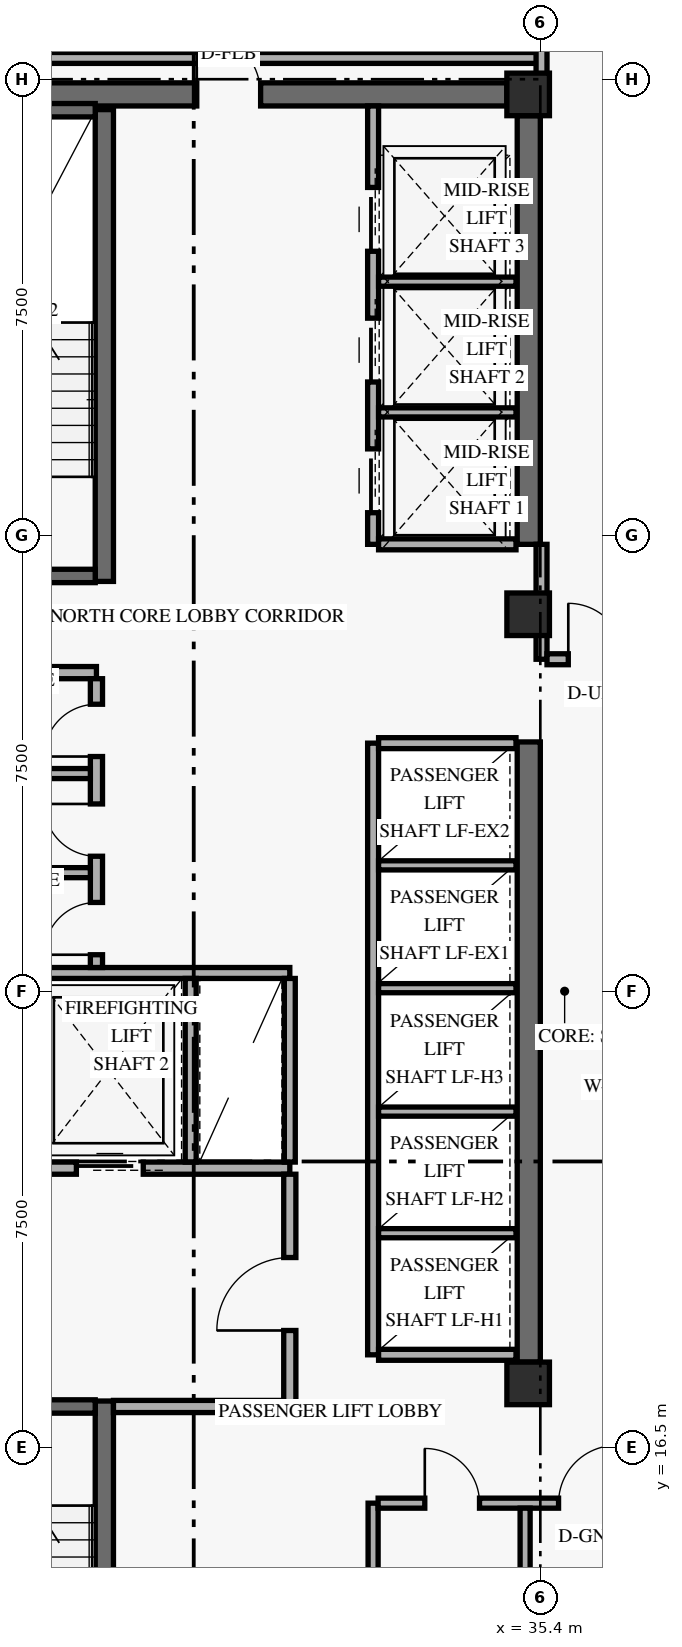
"""IFC4 building model, lengths in metres.
Left out: names, types, materials, properties, quantities, classifications, styles, units other than length and angle.
Written with IfcOpenShell. Run it as: python <this file> out.ifc"""

import sys

from ifc_helpers import new_model, si_unit, direction, frame, frame_2d, origin, origin_2d, place, context, subcontext, project, spatial, rectangle, extrude, element, fill, save


model = new_model("IFC4")
c1 = context("Model", 3, precision=1e-05, world=origin(), true_north=direction((0.0, 1.0)))
c2 = subcontext(c1, "Body", "Model", "MODEL_VIEW")
j1 = project(units=[si_unit("LENGTHUNIT", "METRE"), si_unit("PLANEANGLEUNIT", "RADIAN")], contexts=[c1])
p1 = place(None, origin())
s1 = spatial("IfcSite", under=j1, at=p1, CompositionType="ELEMENT")
p2 = place(p1, origin())
s2 = spatial("IfcBuilding", under=s1, at=p2, CompositionType="ELEMENT")
p3 = place(p2, frame((0.0, 0.0, 162.6)))
s3 = spatial("IfcBuildingStorey", under=s2, at=p3, CompositionType="ELEMENT", Elevation=162.6)
p4 = place(p3, frame((35.21, 17.9, 0.0), z_axis=(0.0, 0.0, 1.0), x_axis=(0.0, 1.0, 0.0)))
e1 = element("IfcWall", 1, at=p4, inside=s3, PredefinedType="SHEAR", context=c2, shape_type="SweptSolid", body=[
    extrude(rectangle(XDim=10.2, YDim=0.38, at=frame_2d((5.1, 0.0))), origin(), (0.0, 0.0, 1.0), 2.748),
])
p5 = place(p3, frame((35.21, 31.35, 0.0), z_axis=(0.0, 0.0, 1.0), x_axis=(0.0, 1.0, 0.0)))
e2 = element("IfcWall", 2, at=p5, inside=s3, PredefinedType="SHEAR", context=c2, shape_type="SweptSolid", body=[
    extrude(rectangle(XDim=7.05, YDim=0.38, at=frame_2d((3.525, 0.0))), origin(), (0.0, 0.0, 1.0), 2.748),
])
p6 = place(p3, frame((24.55, 38.75, 0.0), z_axis=(0.0, 0.0, 1.0), x_axis=(1.0, 0.0, 0.0)))
e3 = element("IfcWall", 3, at=p6, inside=s3, PredefinedType="SHEAR", context=c2, shape_type="SweptSolid", body=[
    extrude(rectangle(XDim=10.3, YDim=0.38, at=frame_2d((5.15, 0.0))), origin(), (0.0, 0.0, 1.0), 3.36),
])
p7 = place(p6, frame((5.2, 0.0, 0.0)))
e4 = element("IfcOpeningElement", 4, at=p7, cuts=e3, PredefinedType="OPENING", context=c2, shape_type="SweptSolid", body=[
    extrude(rectangle(XDim=1.05, YDim=2.15, at=frame_2d((0.525, 1.075))), frame((0.0, 0.2, 0.0), z_axis=(0.0, -1.0, 0.0), x_axis=(1.0, 0.0, 0.0)), (0.0, 0.0, 1.0), 0.4),
])
p8 = place(p3, frame((28.23, 9.5, 0.0), z_axis=(0.0, 0.0, 1.0), x_axis=(0.0, 1.0, 0.0)))
e5 = element("IfcWall", 5, at=p8, inside=s3, PredefinedType="SHEAR", context=c2, shape_type="SweptSolid", body=[
    extrude(rectangle(XDim=7.76, YDim=0.3, at=frame_2d((3.88, 0.0))), origin(), (0.0, 0.0, 1.0), 3.36),
])
p9 = place(p3, frame((24.92, 17.17, 0.0), z_axis=(0.0, 0.0, 1.0), x_axis=(1.0, 0.0, 0.0)))
e6 = element("IfcWall", 6, at=p9, inside=s3, PredefinedType="SHEAR", context=c2, shape_type="SweptSolid", body=[
    extrude(rectangle(XDim=3.16, YDim=0.22, at=frame_2d((1.58, 0.0))), origin(), (0.0, 0.0, 1.0), 3.36),
])
p10 = place(p9, frame((0.78, 0.0, 0.0)))
e7 = element("IfcOpeningElement", 7, at=p10, cuts=e6, PredefinedType="OPENING", context=c2, shape_type="SweptSolid", body=[
    extrude(rectangle(XDim=1.05, YDim=2.15, at=frame_2d((0.525, 1.075))), frame((0.0, 0.12, 0.0), z_axis=(0.0, -1.0, 0.0), x_axis=(1.0, 0.0, 0.0)), (0.0, 0.0, 1.0), 0.24),
])
p11 = place(p3, frame((28.23, 30.74, 0.0), z_axis=(0.0, 0.0, 1.0), x_axis=(0.0, 1.0, 0.0)))
e8 = element("IfcWall", 8, at=p11, inside=s3, PredefinedType="SHEAR", context=c2, shape_type="SweptSolid", body=[
    extrude(rectangle(XDim=7.76, YDim=0.3, at=frame_2d((3.88, 0.0))), origin(), (0.0, 0.0, 1.0), 3.36),
])
p12 = place(p3, frame((24.92, 30.83, 0.0), z_axis=(0.0, 0.0, 1.0), x_axis=(1.0, 0.0, 0.0)))
e9 = element("IfcWall", 9, at=p12, inside=s3, PredefinedType="SHEAR", context=c2, shape_type="SweptSolid", body=[
    extrude(rectangle(XDim=3.16, YDim=0.22, at=frame_2d((1.58, 0.0))), origin(), (0.0, 0.0, 1.0), 3.36),
])
p13 = place(p12, frame((0.78, 0.0, 0.0)))
e10 = element("IfcOpeningElement", 10, at=p13, cuts=e9, PredefinedType="OPENING", context=c2, shape_type="SweptSolid", body=[
    extrude(rectangle(XDim=1.05, YDim=2.15, at=frame_2d((0.525, 1.075))), frame((0.0, 0.12, 0.0), z_axis=(0.0, -1.0, 0.0), x_axis=(1.0, 0.0, 0.0)), (0.0, 0.0, 1.0), 0.24),
])
p14 = place(p3, frame((24.92, 38.49, 0.0), z_axis=(0.0, 0.0, 1.0), x_axis=(1.0, 0.0, 0.0)))
e11 = element("IfcWall", 11, at=p14, inside=s3, PredefinedType="SHEAR", context=c2, shape_type="SweptSolid", body=[
    extrude(rectangle(XDim=3.16, YDim=0.22, at=frame_2d((1.58, 0.0))), origin(), (0.0, 0.0, 1.0), 3.36),
])
for number, where, z_axis, x_axis in (
    (12, (35.2, 17.55, 0.0), (0.0, 0.0, 1.0), (1.0, 0.0, 0.0)),
    (13, (35.2, 30.2, 0.0), (0.0, 0.0, 1.0), (1.0, 0.0, 0.0)),
    (14, (35.2, 38.75, 0.0), (0.0, 0.0, 1.0), (1.0, 0.0, 0.0)),
):
    element("IfcColumn", number, at=place(p3, frame(where, z_axis=z_axis, x_axis=x_axis)), inside=s3, PredefinedType="COLUMN", context=c2, shape_type="SweptSolid", body=[
        extrude(rectangle(XDim=0.7, YDim=0.7, at=origin_2d()), origin(), (0.0, 0.0, 1.0), 3.6),
    ])
p15 = place(p3, frame((24.45, 21.09, 0.0), z_axis=(0.0, 0.0, 1.0), x_axis=(1.0, 0.0, 0.0)))
e15 = element("IfcWall", 15, at=p15, inside=s3, PredefinedType="STANDARD", context=c2, shape_type="SweptSolid", body=[
    extrude(rectangle(XDim=6.83, YDim=0.2, at=frame_2d((3.415, 0.0))), origin(), (0.0, 0.0, 1.0), 3.36),
])
p16 = place(p15, frame((0.72, 0.0, 0.0)))
e16 = element("IfcOpeningElement", 16, at=p16, cuts=e15, PredefinedType="OPENING", context=c2, shape_type="SweptSolid", body=[
    extrude(rectangle(XDim=1.1, YDim=2.2, at=frame_2d((0.55, 1.1))), frame((0.0, 0.11, 0.0), z_axis=(0.0, -1.0, 0.0), x_axis=(1.0, 0.0, 0.0)), (0.0, 0.0, 1.0), 0.22),
])
p17 = place(p15, frame((3.32, 0.0, 0.0)))
e17 = element("IfcOpeningElement", 17, at=p17, cuts=e15, PredefinedType="OPENING", context=c2, shape_type="SweptSolid", body=[
    extrude(rectangle(XDim=1.1, YDim=2.2, at=frame_2d((0.55, 1.1))), frame((0.0, 0.11, 0.0), z_axis=(0.0, -1.0, 0.0), x_axis=(1.0, 0.0, 0.0)), (0.0, 0.0, 1.0), 0.22),
])
p18 = place(p3, frame((28.38, 17.17, 0.0), z_axis=(0.0, 0.0, 1.0), x_axis=(1.0, 0.0, 0.0)))
e18 = element("IfcWall", 18, at=p18, inside=s3, PredefinedType="STANDARD", context=c2, shape_type="SweptSolid", body=[
    extrude(rectangle(XDim=2.9, YDim=0.2, at=frame_2d((1.45, 0.0))), origin(), (0.0, 0.0, 1.0), 3.36),
])
p19 = place(p3, frame((31.28, 17.07, 0.0), z_axis=(0.0, 0.0, 1.0), x_axis=(0.0, 1.0, 0.0)))
e19 = element("IfcWall", 19, at=p19, inside=s3, PredefinedType="STANDARD", context=c2, shape_type="SweptSolid", body=[
    extrude(rectangle(XDim=3.92, YDim=0.2, at=frame_2d((1.96, 0.0))), origin(), (0.0, 0.0, 1.0), 2.73),
])
p20 = place(p19, frame((1.35, 0.0, 0.0)))
e20 = element("IfcOpeningElement", 20, at=p20, cuts=e19, PredefinedType="OPENING", context=c2, shape_type="SweptSolid", body=[
    extrude(rectangle(XDim=1.2, YDim=2.15, at=frame_2d((0.6, 1.075))), frame((0.0, 0.11, 0.0), z_axis=(0.0, -1.0, 0.0), x_axis=(1.0, 0.0, 0.0)), (0.0, 0.0, 1.0), 0.22),
])
p21 = place(p3, frame((24.45, 24.3, 0.0), z_axis=(0.0, 0.0, 1.0), x_axis=(1.0, 0.0, 0.0)))
e21 = element("IfcWall", 21, at=p21, inside=s3, PredefinedType="STANDARD", context=c2, shape_type="SweptSolid", body=[
    extrude(rectangle(XDim=6.83, YDim=0.18, at=frame_2d((3.415, 0.0))), origin(), (0.0, 0.0, 1.0), 3.36),
])
for number, where, z_axis, x_axis in (
    (22, (29.65, 21.19, 0.0), (0.0, 0.0, 1.0), (0.0, 1.0, 0.0)),
    (23, (31.28, 21.19, 0.0), (0.0, 0.0, 1.0), (0.0, 1.0, 0.0)),
):
    element("IfcWall", number, at=place(p3, frame(where, z_axis=z_axis, x_axis=x_axis)), inside=s3, PredefinedType="STANDARD", context=c2, shape_type="SweptSolid", body=[
        extrude(rectangle(XDim=3.02, YDim=0.18, at=frame_2d((1.51, 0.0))), origin(), (0.0, 0.0, 1.0), 3.36),
    ])
p22 = place(p3, frame((24.45, 29.24, 0.0), z_axis=(0.0, 0.0, 1.0), x_axis=(1.0, 0.0, 0.0)))
e24 = element("IfcWall", 24, at=p22, inside=s3, PredefinedType="STANDARD", context=c2, shape_type="SweptSolid", body=[
    extrude(rectangle(XDim=3.65, YDim=0.2, at=frame_2d((1.825, 0.0))), origin(), (0.0, 0.0, 1.0), 3.36),
])
p23 = place(p3, frame((28.1, 24.39, 0.0), z_axis=(0.0, 0.0, 1.0), x_axis=(0.0, 1.0, 0.0)))
e25 = element("IfcWall", 25, at=p23, inside=s3, PredefinedType="STANDARD", context=c2, shape_type="SweptSolid", body=[
    extrude(rectangle(XDim=4.75, YDim=0.2, at=frame_2d((2.375, 0.0))), origin(), (0.0, 0.0, 1.0), 3.36),
])
p24 = place(p23, frame((0.21, 0.0, 0.0)))
e26 = element("IfcOpeningElement", 26, at=p24, cuts=e25, PredefinedType="OPENING", context=c2, shape_type="SweptSolid", body=[
    extrude(rectangle(XDim=0.86, YDim=2.1, at=frame_2d((0.43, 1.05))), frame((0.0, 0.11, 0.0), z_axis=(0.0, -1.0, 0.0), x_axis=(1.0, 0.0, 0.0)), (0.0, 0.0, 1.0), 0.22),
])
p25 = place(p23, frame((1.83, 0.0, 0.0)))
e27 = element("IfcOpeningElement", 27, at=p25, cuts=e25, PredefinedType="OPENING", context=c2, shape_type="SweptSolid", body=[
    extrude(rectangle(XDim=0.86, YDim=2.1, at=frame_2d((0.43, 1.05))), frame((0.0, 0.11, 0.0), z_axis=(0.0, -1.0, 0.0), x_axis=(1.0, 0.0, 0.0)), (0.0, 0.0, 1.0), 0.22),
])
p26 = place(p23, frame((3.47, 0.0, 0.0)))
e28 = element("IfcOpeningElement", 28, at=p26, cuts=e25, PredefinedType="OPENING", context=c2, shape_type="SweptSolid", body=[
    extrude(rectangle(XDim=0.86, YDim=2.1, at=frame_2d((0.43, 1.05))), frame((0.0, 0.11, 0.0), z_axis=(0.0, -1.0, 0.0), x_axis=(1.0, 0.0, 0.0)), (0.0, 0.0, 1.0), 0.22),
])
for number, where, z_axis, x_axis in (
    (29, (24.45, 25.95, 0.0), (0.0, 0.0, 1.0), (1.0, 0.0, 0.0)),
    (30, (24.45, 27.58, 0.0), (0.0, 0.0, 1.0), (1.0, 0.0, 0.0)),
):
    element("IfcWall", number, at=place(p3, frame(where, z_axis=z_axis, x_axis=x_axis)), inside=s3, PredefinedType="PARTITIONING", context=c2, shape_type="SweptSolid", body=[
        extrude(rectangle(XDim=3.55, YDim=0.165, at=frame_2d((1.775, 0.0))), origin(), (0.0, 0.0, 1.0), 3.36),
    ])
p27 = place(p3, frame((32.65, 18.02, 0.0), z_axis=(0.0, 0.0, 1.0), x_axis=(0.0, 1.0, 0.0)))
e31 = element("IfcWall", 31, at=p27, inside=s3, PredefinedType="STANDARD", context=c2, shape_type="SweptSolid", body=[
    extrude(rectangle(XDim=10.06, YDim=0.18, at=frame_2d((5.03, 0.0))), origin(), (0.0, 0.0, 1.0), 3.36),
])
for number, where, z_axis, x_axis in (
    (32, (32.74, 18.02, 0.0), (0.0, 0.0, 1.0), (1.0, 0.0, 0.0)),
    (33, (32.74, 28.08, 0.0), (0.0, 0.0, 1.0), (1.0, 0.0, 0.0)),
):
    element("IfcWall", number, at=place(p3, frame(where, z_axis=z_axis, x_axis=x_axis)), inside=s3, PredefinedType="STANDARD", context=c2, shape_type="SweptSolid", body=[
        extrude(rectangle(XDim=2.26, YDim=0.18, at=frame_2d((1.13, 0.0))), origin(), (0.0, 0.0, 1.0), 3.36),
    ])
for number, where, z_axis, x_axis in (
    (34, (32.74, 20.02, 0.0), (0.0, 0.0, 1.0), (1.0, 0.0, 0.0)),
    (35, (32.74, 22.02, 0.0), (0.0, 0.0, 1.0), (1.0, 0.0, 0.0)),
    (36, (32.74, 24.05, 0.0), (0.0, 0.0, 1.0), (1.0, 0.0, 0.0)),
    (37, (32.74, 26.07, 0.0), (0.0, 0.0, 1.0), (1.0, 0.0, 0.0)),
):
    element("IfcWall", number, at=place(p3, frame(where, z_axis=z_axis, x_axis=x_axis)), inside=s3, PredefinedType="STANDARD", context=c2, shape_type="SweptSolid", body=[
        extrude(rectangle(XDim=2.26, YDim=0.15, at=frame_2d((1.13, 0.0))), origin(), (0.0, 0.0, 1.0), 3.36),
    ])
p28 = place(p3, frame((32.65, 31.35, 0.0), z_axis=(0.0, 0.0, 1.0), x_axis=(0.0, 1.0, 0.0)))
e38 = element("IfcWall", 38, at=p28, inside=s3, PredefinedType="STANDARD", context=c2, shape_type="SweptSolid", body=[
    extrude(rectangle(XDim=7.21, YDim=0.18, at=frame_2d((3.605, 0.0))), origin(), (0.0, 0.0, 1.0), 3.36),
])
p29 = place(p28, frame((0.52, 0.0, 0.0)))
e39 = element("IfcOpeningElement", 39, at=p29, cuts=e38, PredefinedType="OPENING", context=c2, shape_type="SweptSolid", body=[
    extrude(rectangle(XDim=1.05, YDim=2.2, at=frame_2d((0.525, 1.1))), frame((0.0, 0.1, 0.0), z_axis=(0.0, -1.0, 0.0), x_axis=(1.0, 0.0, 0.0)), (0.0, 0.0, 1.0), 0.2),
])
p30 = place(p28, frame((2.67, 0.0, 0.0)))
e40 = element("IfcOpeningElement", 40, at=p30, cuts=e38, PredefinedType="OPENING", context=c2, shape_type="SweptSolid", body=[
    extrude(rectangle(XDim=1.05, YDim=2.2, at=frame_2d((0.525, 1.1))), frame((0.0, 0.1, 0.0), z_axis=(0.0, -1.0, 0.0), x_axis=(1.0, 0.0, 0.0)), (0.0, 0.0, 1.0), 0.2),
])
p31 = place(p28, frame((4.82, 0.0, 0.0)))
e41 = element("IfcOpeningElement", 41, at=p31, cuts=e38, PredefinedType="OPENING", context=c2, shape_type="SweptSolid", body=[
    extrude(rectangle(XDim=1.05, YDim=2.2, at=frame_2d((0.525, 1.1))), frame((0.0, 0.1, 0.0), z_axis=(0.0, -1.0, 0.0), x_axis=(1.0, 0.0, 0.0)), (0.0, 0.0, 1.0), 0.2),
])
p32 = place(p3, frame((32.74, 31.35, 0.0), z_axis=(0.0, 0.0, 1.0), x_axis=(1.0, 0.0, 0.0)))
e42 = element("IfcWall", 42, at=p32, inside=s3, PredefinedType="STANDARD", context=c2, shape_type="SweptSolid", body=[
    extrude(rectangle(XDim=2.26, YDim=0.18, at=frame_2d((1.13, 0.0))), origin(), (0.0, 0.0, 1.0), 3.36),
])
for number, where, z_axis, x_axis in (
    (43, (32.74, 33.52, 0.0), (0.0, 0.0, 1.0), (1.0, 0.0, 0.0)),
    (44, (32.74, 35.67, 0.0), (0.0, 0.0, 1.0), (1.0, 0.0, 0.0)),
):
    element("IfcWall", number, at=place(p3, frame(where, z_axis=z_axis, x_axis=x_axis)), inside=s3, PredefinedType="STANDARD", context=c2, shape_type="SweptSolid", body=[
        extrude(rectangle(XDim=2.26, YDim=0.15, at=frame_2d((1.13, 0.0))), origin(), (0.0, 0.0, 1.0), 3.36),
    ])
p33 = place(p3, frame((32.65, 9.5, 0.0), z_axis=(0.0, 0.0, 1.0), x_axis=(0.0, 1.0, 0.0)))
e45 = element("IfcWall", 45, at=p33, inside=s3, PredefinedType="PARTITIONING", context=c2, shape_type="SweptSolid", body=[
    extrude(rectangle(XDim=6.08, YDim=0.165, at=frame_2d((3.04, 0.0))), origin(), (0.0, 0.0, 1.0), 3.36),
])
p34 = place(p3, frame((32.732, 15.58, 0.0), z_axis=(0.0, 0.0, 1.0), x_axis=(1.0, 0.0, 0.0)))
e46 = element("IfcWall", 46, at=p34, inside=s3, PredefinedType="PARTITIONING", context=c2, shape_type="SweptSolid", body=[
    extrude(rectangle(XDim=4.818, YDim=0.165, at=frame_2d((2.409, 0.0))), origin(), (0.0, 0.0, 1.0), 2.73),
])
p35 = place(p34, frame((0.768, 0.0, 0.0)))
e47 = element("IfcOpeningElement", 47, at=p35, cuts=e46, PredefinedType="OPENING", context=c2, shape_type="SweptSolid", body=[
    extrude(rectangle(XDim=0.9, YDim=2.1, at=frame_2d((0.45, 1.05))), frame((0.0, 0.093, 0.0), z_axis=(0.0, -1.0, 0.0), x_axis=(1.0, 0.0, 0.0)), (0.0, 0.0, 1.0), 0.185),
])
p36 = place(p34, frame((2.968, 0.0, 0.0)))
e48 = element("IfcOpeningElement", 48, at=p36, cuts=e46, PredefinedType="OPENING", context=c2, shape_type="SweptSolid", body=[
    extrude(rectangle(XDim=0.95, YDim=2.15, at=frame_2d((0.475, 1.075))), frame((0.0, 0.093, 0.0), z_axis=(0.0, -1.0, 0.0), x_axis=(1.0, 0.0, 0.0)), (0.0, 0.0, 1.0), 0.185),
])
p37 = place(p3, frame((35.15, 9.5, 0.0), z_axis=(0.0, 0.0, 1.0), x_axis=(0.0, 1.0, 0.0)))
e49 = element("IfcWall", 49, at=p37, inside=s3, PredefinedType="PARTITIONING", context=c2, shape_type="SweptSolid", body=[
    extrude(rectangle(XDim=5.998, YDim=0.165, at=frame_2d((2.999, 0.0))), origin(), (0.0, 0.0, 1.0), 2.73),
])
p38 = place(p3, frame((35.42, 29.46, 0.0), z_axis=(0.0, 0.0, 1.0), x_axis=(0.0, 1.0, 0.0)))
e50 = element("IfcWall", 50, at=p38, inside=s3, PredefinedType="STANDARD", context=c2, shape_type="SweptSolid", body=[
    extrude(rectangle(XDim=1.89, YDim=0.18, at=frame_2d((0.945, 0.0))), origin(), (0.0, 0.0, 1.0), 2.73),
])
p39 = place(p3, frame((35.51, 29.46, 0.0), z_axis=(0.0, 0.0, 1.0), x_axis=(1.0, 0.0, 0.0)))
e51 = element("IfcWall", 51, at=p39, inside=s3, PredefinedType="STANDARD", context=c2, shape_type="SweptSolid", body=[
    extrude(rectangle(XDim=14.29, YDim=0.18, at=frame_2d((7.145, 0.0))), origin(), (0.0, 0.0, 1.0), 2.73),
])
p40 = place(p39, frame((0.35, 0.0, 0.0)))
e52 = element("IfcOpeningElement", 52, at=p40, cuts=e51, PredefinedType="OPENING", context=c2, shape_type="SweptSolid", body=[
    extrude(rectangle(XDim=0.92, YDim=2.15, at=frame_2d((0.46, 1.075))), frame((0.0, 0.1, 0.0), z_axis=(0.0, -1.0, 0.0), x_axis=(1.0, 0.0, 0.0)), (0.0, 0.0, 1.0), 0.2),
])
p41 = place(p39, frame((7.828, 0.0, 0.0)))
e53 = element("IfcOpeningElement", 53, at=p41, cuts=e51, PredefinedType="OPENING", context=c2, shape_type="SweptSolid", body=[
    extrude(rectangle(XDim=0.92, YDim=2.15, at=frame_2d((0.46, 1.075))), frame((0.0, 0.1, 0.0), z_axis=(0.0, -1.0, 0.0), x_axis=(1.0, 0.0, 0.0)), (0.0, 0.0, 1.0), 0.2),
])
p42 = place(p3, frame((23.85, 39.35, 0.0), z_axis=(0.0, 0.0, 1.0), x_axis=(1.0, 0.0, 0.0)))
e54 = element("IfcWall", 54, at=p42, inside=s3, PredefinedType="STANDARD", context=c2, shape_type="SweptSolid", body=[
    extrude(rectangle(XDim=11.57, YDim=0.18, at=frame_2d((5.785, 0.0))), origin(), (0.0, 0.0, 1.0), 2.73),
])
p43 = place(p3, frame((35.42, 38.75, 0.0), z_axis=(0.0, 0.0, 1.0), x_axis=(0.0, 1.0, 0.0)))
e55 = element("IfcWall", 55, at=p43, inside=s3, PredefinedType="PARTITIONING", context=c2, shape_type="SweptSolid", body=[
    extrude(rectangle(XDim=4.97, YDim=0.18, at=frame_2d((2.485, 0.0))), origin(), (0.0, 0.0, 1.0), 2.73),
])
p44 = place(p17, origin())
e56 = element("IfcDoor", 56, at=p44, inside=s3, OperationType="SLIDING_TO_LEFT", PredefinedType="DOOR", context=c2, shape_type="SweptSolid", body=[
    extrude(rectangle(XDim=1.1, YDim=2.2, at=frame_2d((0.55, 1.1))), frame((0.0, 0.025, 0.0), z_axis=(0.0, -1.0, 0.0), x_axis=(1.0, 0.0, 0.0)), (0.0, 0.0, 1.0), 0.05),
])
fill(e17, e56)
p45 = place(p20, origin())
e57 = element("IfcDoor", 57, at=p45, inside=s3, OperationType="SINGLE_SWING_LEFT", PredefinedType="DOOR", context=c2, shape_type="SweptSolid", body=[
    extrude(rectangle(XDim=1.2, YDim=2.15, at=frame_2d((0.6, 1.075))), frame((0.0, 0.025, 0.0), z_axis=(0.0, -1.0, 0.0), x_axis=(1.0, 0.0, 0.0)), (0.0, 0.0, 1.0), 0.05),
])
fill(e20, e57)
p46 = place(p24, origin())
e58 = element("IfcDoor", 58, at=p46, inside=s3, OperationType="SINGLE_SWING_LEFT", PredefinedType="DOOR", context=c2, shape_type="SweptSolid", body=[
    extrude(rectangle(XDim=0.86, YDim=2.1, at=frame_2d((0.43, 1.05))), frame((0.0, 0.025, 0.0), z_axis=(0.0, -1.0, 0.0), x_axis=(1.0, 0.0, 0.0)), (0.0, 0.0, 1.0), 0.05),
])
fill(e26, e58)
p47 = place(p25, origin())
e59 = element("IfcDoor", 59, at=p47, inside=s3, OperationType="SINGLE_SWING_RIGHT", PredefinedType="DOOR", context=c2, shape_type="SweptSolid", body=[
    extrude(rectangle(XDim=0.86, YDim=2.1, at=frame_2d((0.43, 1.05))), frame((0.0, 0.025, 0.0), z_axis=(0.0, -1.0, 0.0), x_axis=(1.0, 0.0, 0.0)), (0.0, 0.0, 1.0), 0.05),
])
fill(e27, e59)
p48 = place(p26, origin())
e60 = element("IfcDoor", 60, at=p48, inside=s3, OperationType="SINGLE_SWING_LEFT", PredefinedType="DOOR", context=c2, shape_type="SweptSolid", body=[
    extrude(rectangle(XDim=0.86, YDim=2.1, at=frame_2d((0.43, 1.05))), frame((0.0, 0.025, 0.0), z_axis=(0.0, -1.0, 0.0), x_axis=(1.0, 0.0, 0.0)), (0.0, 0.0, 1.0), 0.05),
])
fill(e28, e60)
p49 = place(p29, origin())
e61 = element("IfcDoor", 61, at=p49, inside=s3, OperationType="SLIDING_TO_LEFT", PredefinedType="DOOR", context=c2, shape_type="SweptSolid", body=[
    extrude(rectangle(XDim=1.05, YDim=2.2, at=frame_2d((0.525, 1.1))), frame((0.0, 0.025, 0.0), z_axis=(0.0, -1.0, 0.0), x_axis=(1.0, 0.0, 0.0)), (0.0, 0.0, 1.0), 0.05),
])
fill(e39, e61)
p50 = place(p30, origin())
e62 = element("IfcDoor", 62, at=p50, inside=s3, OperationType="SLIDING_TO_LEFT", PredefinedType="DOOR", context=c2, shape_type="SweptSolid", body=[
    extrude(rectangle(XDim=1.05, YDim=2.2, at=frame_2d((0.525, 1.1))), frame((0.0, 0.025, 0.0), z_axis=(0.0, -1.0, 0.0), x_axis=(1.0, 0.0, 0.0)), (0.0, 0.0, 1.0), 0.05),
])
fill(e40, e62)
p51 = place(p31, origin())
e63 = element("IfcDoor", 63, at=p51, inside=s3, OperationType="SLIDING_TO_LEFT", PredefinedType="DOOR", context=c2, shape_type="SweptSolid", body=[
    extrude(rectangle(XDim=1.05, YDim=2.2, at=frame_2d((0.525, 1.1))), frame((0.0, 0.025, 0.0), z_axis=(0.0, -1.0, 0.0), x_axis=(1.0, 0.0, 0.0)), (0.0, 0.0, 1.0), 0.05),
])
fill(e41, e63)
p52 = place(p35, origin())
e64 = element("IfcDoor", 64, at=p52, inside=s3, OperationType="SINGLE_SWING_LEFT", PredefinedType="DOOR", context=c2, shape_type="SweptSolid", body=[
    extrude(rectangle(XDim=0.9, YDim=2.1, at=frame_2d((0.45, 1.05))), frame((0.0, 0.025, 0.0), z_axis=(0.0, -1.0, 0.0), x_axis=(1.0, 0.0, 0.0)), (0.0, 0.0, 1.0), 0.05),
])
fill(e47, e64)
p53 = place(p36, origin())
e65 = element("IfcDoor", 65, at=p53, inside=s3, OperationType="SINGLE_SWING_RIGHT", PredefinedType="DOOR", context=c2, shape_type="SweptSolid", body=[
    extrude(rectangle(XDim=0.95, YDim=2.15, at=frame_2d((0.475, 1.075))), frame((0.0, 0.025, 0.0), z_axis=(0.0, -1.0, 0.0), x_axis=(1.0, 0.0, 0.0)), (0.0, 0.0, 1.0), 0.05),
])
fill(e48, e65)
p54 = place(p7, frame((1.05, 0.0, 0.0), z_axis=(0.0, 0.0, 1.0), x_axis=(-1.0, 0.0, 0.0)))
e66 = element("IfcDoor", 66, at=p54, inside=s3, OperationType="SINGLE_SWING_RIGHT", PredefinedType="DOOR", context=c2, shape_type="SweptSolid", body=[
    extrude(rectangle(XDim=1.05, YDim=2.15, at=frame_2d((0.525, 1.075))), frame((0.0, 0.025, 0.0), z_axis=(0.0, -1.0, 0.0), x_axis=(1.0, 0.0, 0.0)), (0.0, 0.0, 1.0), 0.05),
])
fill(e4, e66)
p55 = place(p40, origin())
e67 = element("IfcDoor", 67, at=p55, inside=s3, OperationType="SINGLE_SWING_LEFT", PredefinedType="DOOR", context=c2, shape_type="SweptSolid", body=[
    extrude(rectangle(XDim=0.92, YDim=2.15, at=frame_2d((0.46, 1.075))), frame((0.0, 0.025, 0.0), z_axis=(0.0, -1.0, 0.0), x_axis=(1.0, 0.0, 0.0)), (0.0, 0.0, 1.0), 0.05),
])
fill(e52, e67)
save(model, sys.argv[1])
